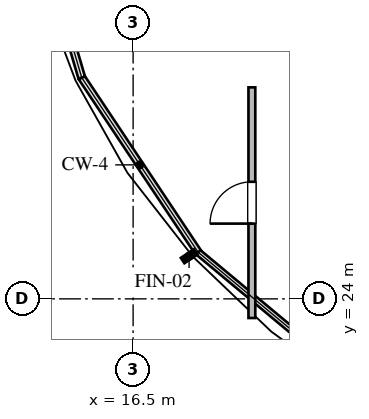
"""IFC4 building model, lengths in metres.
Left out: names, types, materials, properties, quantities, classifications, styles, units other than length and angle.
Written with IfcOpenShell. Run it as: python <this file> out.ifc"""

import sys

from ifc_helpers import new_model, si_unit, direction, frame, frame_2d, origin, place, context, subcontext, project, spatial, rectangle, extrude, element, fill, save


model = new_model("IFC4")
c1 = context("Model", 3, precision=1e-05, world=origin(), true_north=direction((0.0, 1.0)))
c2 = subcontext(c1, "Body", "Model", "MODEL_VIEW")
j1 = project(units=[si_unit("LENGTHUNIT", "METRE"), si_unit("PLANEANGLEUNIT", "RADIAN")], contexts=[c1])
p1 = place(None, origin())
s1 = spatial("IfcSite", under=j1, at=p1, CompositionType="ELEMENT")
p2 = place(p1, origin())
s2 = spatial("IfcBuilding", under=s1, at=p2, CompositionType="ELEMENT")
p3 = place(p2, frame((0.0, 0.0, 206.4)))
s3 = spatial("IfcBuildingStorey", under=s2, at=p3, CompositionType="ELEMENT", Elevation=206.4)
p4 = place(p3, frame((19.625, 23.496, 0.0), z_axis=(0.0, 0.0, 1.0), x_axis=(0.0, 1.0, 0.0)))
e1 = element("IfcWall", 1, at=p4, inside=s3, PredefinedType="PARTITIONING", context=c2, shape_type="SweptSolid", body=[
    extrude(rectangle(XDim=6.069, YDim=0.18, at=frame_2d((3.034, 0.0))), origin(), (0.0, 0.0, 1.0), 2.817),
])
p5 = place(p4, frame((2.484, 0.0, 0.0)))
e2 = element("IfcOpeningElement", 2, at=p5, cuts=e1, PredefinedType="OPENING", context=c2, shape_type="SweptSolid", body=[
    extrude(rectangle(XDim=1.1, YDim=2.1, at=frame_2d((0.55, 1.05))), frame((0.0, 0.1, 0.0), z_axis=(0.0, -1.0, 0.0), x_axis=(1.0, 0.0, 0.0)), (0.0, 0.0, 1.0), 0.2),
])
p6 = place(p5, origin())
e3 = element("IfcDoor", 3, at=p6, inside=s3, OperationType="SINGLE_SWING_LEFT", PredefinedType="DOOR", context=c2, shape_type="SweptSolid", body=[
    extrude(rectangle(XDim=1.1, YDim=2.1, at=frame_2d((0.55, 1.05))), frame((0.0, 0.025, 0.0), z_axis=(0.0, -1.0, 0.0), x_axis=(1.0, 0.0, 0.0)), (0.0, 0.0, 1.0), 0.05),
])
fill(e2, e3)
save(model, sys.argv[1])
